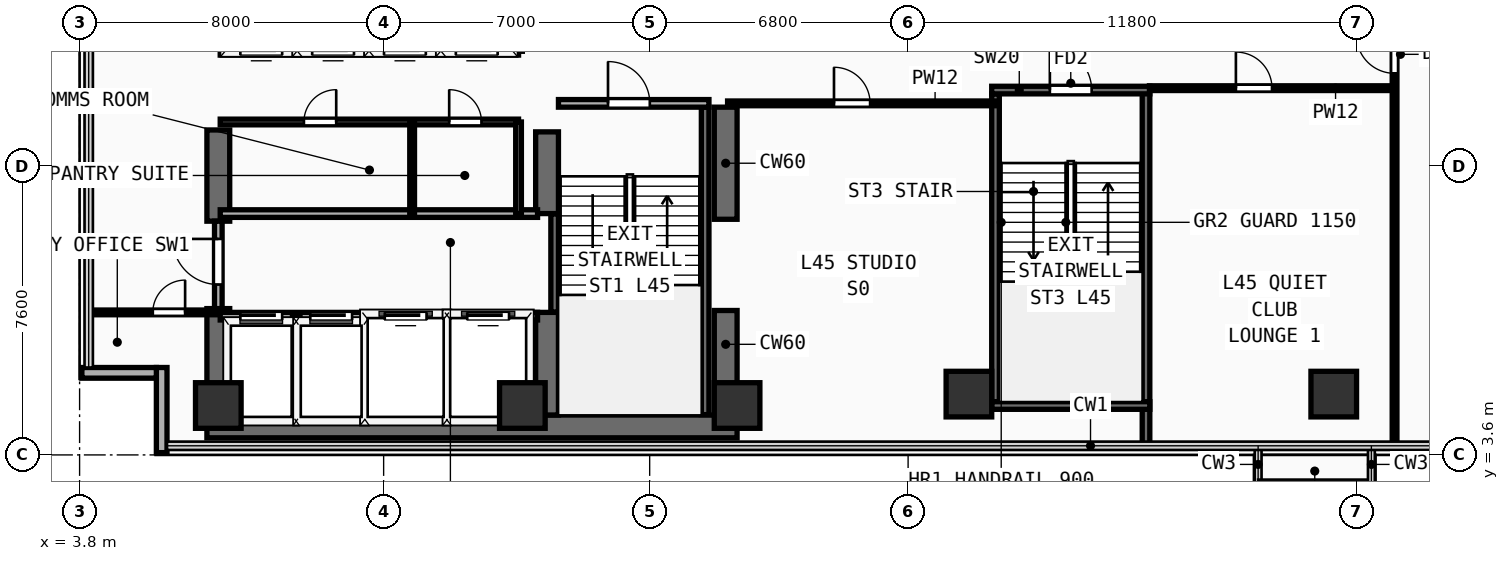
"""IFC4 building model, lengths in metres.
Left out: names, types, materials, properties, quantities, classifications, styles, units other than length and angle.
Written with IfcOpenShell. Run it as: python <this file> out.ifc"""

import sys

from ifc_helpers import new_model, si_unit, direction, frame, frame_2d, origin, origin_2d, place, context, subcontext, project, spatial, rectangle, extrude, element, fill, save


model = new_model("IFC4")
c1 = context("Model", 3, precision=1e-05, world=origin(), true_north=direction((0.0, 1.0)))
c2 = subcontext(c1, "Body", "Model", "MODEL_VIEW")
j1 = project(units=[si_unit("LENGTHUNIT", "METRE"), si_unit("PLANEANGLEUNIT", "RADIAN")], contexts=[c1])
p1 = place(None, origin())
s1 = spatial("IfcSite", under=j1, at=p1, CompositionType="ELEMENT")
p2 = place(p1, origin())
s2 = spatial("IfcBuilding", under=s1, at=p2, CompositionType="ELEMENT")
p3 = place(p2, frame((0.0, 0.0, 176.6)))
s3 = spatial("IfcBuildingStorey", under=s2, at=p3, CompositionType="ELEMENT", Elevation=176.6)
p4 = place(p3, frame((7.15, 4.35, 0.0), z_axis=(0.0, 0.0, 1.0), x_axis=(1.0, 0.0, 0.0)))
e1 = element("IfcWall", 1, at=p4, inside=s3, PredefinedType="SHEAR", context=c2, shape_type="SweptSolid", body=[
    extrude(rectangle(XDim=13.95, YDim=0.6, at=frame_2d((6.975, 0.0))), origin(), (0.0, 0.0, 1.0), 3.56),
])
p5 = place(p3, frame((7.45, 4.65, 0.0), z_axis=(0.0, 0.0, 1.0), x_axis=(0.0, 1.0, 0.0)))
e2 = element("IfcWall", 2, at=p5, inside=s3, PredefinedType="SHEAR", context=c2, shape_type="SweptSolid", body=[
    extrude(rectangle(XDim=2.8, YDim=0.6, at=frame_2d((1.4, 0.0))), origin(), (0.0, 0.0, 1.0), 3.56),
])
p6 = place(p3, frame((7.45, 9.75, 0.0), z_axis=(0.0, 0.0, 1.0), x_axis=(0.0, 1.0, 0.0)))
e3 = element("IfcWall", 3, at=p6, inside=s3, PredefinedType="SHEAR", context=c2, shape_type="SweptSolid", body=[
    extrude(rectangle(XDim=2.4, YDim=0.6, at=frame_2d((1.2, 0.0))), origin(), (0.0, 0.0, 1.0), 3.56),
])
p7 = place(p3, frame((20.8, 4.65, 0.0), z_axis=(0.0, 0.0, 1.0), x_axis=(0.0, 1.0, 0.0)))
e4 = element("IfcWall", 4, at=p7, inside=s3, PredefinedType="SHEAR", context=c2, shape_type="SweptSolid", body=[
    extrude(rectangle(XDim=2.75, YDim=0.6, at=frame_2d((1.375, 0.0))), origin(), (0.0, 0.0, 1.0), 3.56),
])
p8 = place(p3, frame((20.8, 9.8, 0.0), z_axis=(0.0, 0.0, 1.0), x_axis=(0.0, 1.0, 0.0)))
e5 = element("IfcWall", 5, at=p8, inside=s3, PredefinedType="SHEAR", context=c2, shape_type="SweptSolid", body=[
    extrude(rectangle(XDim=2.95, YDim=0.6, at=frame_2d((1.475, 0.0))), origin(), (0.0, 0.0, 1.0), 3.56),
])
p9 = place(p3, frame((16.1, 4.65, 0.0), z_axis=(0.0, 0.0, 1.0), x_axis=(0.0, 1.0, 0.0)))
e6 = element("IfcWall", 6, at=p9, inside=s3, PredefinedType="SHEAR", context=c2, shape_type="SweptSolid", body=[
    extrude(rectangle(XDim=2.7, YDim=0.6, at=frame_2d((1.35, 0.0))), origin(), (0.0, 0.0, 1.0), 3.56),
])
p10 = place(p3, frame((16.1, 9.95, 0.0), z_axis=(0.0, 0.0, 1.0), x_axis=(0.0, 1.0, 0.0)))
e7 = element("IfcWall", 7, at=p10, inside=s3, PredefinedType="SHEAR", context=c2, shape_type="SweptSolid", body=[
    extrude(rectangle(XDim=2.15, YDim=0.6, at=frame_2d((1.075, 0.0))), origin(), (0.0, 0.0, 1.0), 3.56),
])
for number, where, z_axis, x_axis in (
    (8, (7.45, 4.9, 0.0), (0.0, 0.0, 1.0), (1.0, 0.0, 0.0)),
    (9, (15.45, 4.9, 0.0), (0.0, 0.0, 1.0), (1.0, 0.0, 0.0)),
    (10, (21.1, 4.9, 0.0), (0.0, 0.0, 1.0), (1.0, 0.0, 0.0)),
    (11, (27.2, 5.2, 0.0), (0.0, 0.0, 1.0), (1.0, 0.0, 0.0)),
    (12, (36.8, 5.2, 0.0), (0.0, 0.0, 1.0), (1.0, 0.0, 0.0)),
):
    element("IfcColumn", number, at=place(p3, frame(where, z_axis=z_axis, x_axis=x_axis)), inside=s3, PredefinedType="COLUMN", context=c2, shape_type="SweptSolid", body=[
        extrude(rectangle(XDim=1.2, YDim=1.2, at=origin_2d()), origin(), (0.0, 0.0, 1.0), 3.56),
    ])
p11 = place(p3, frame((5.96, 3.66, 0.0), z_axis=(0.0, 0.0, 1.0), x_axis=(0.0, 1.0, 0.0)))
e13 = element("IfcWall", 13, at=p11, inside=s3, PredefinedType="SOLIDWALL", context=c2, shape_type="SweptSolid", body=[
    extrude(rectangle(XDim=2.24, YDim=0.28, at=frame_2d((1.12, 0.0))), origin(), (0.0, 0.0, 1.0), 3.56),
])
p12 = place(p3, frame((3.86, 5.76, 0.0), z_axis=(0.0, 0.0, 1.0), x_axis=(1.0, 0.0, 0.0)))
e14 = element("IfcWall", 14, at=p12, inside=s3, PredefinedType="SOLIDWALL", context=c2, shape_type="SweptSolid", body=[
    extrude(rectangle(XDim=1.96, YDim=0.28, at=frame_2d((0.98, 0.0))), origin(), (0.0, 0.0, 1.0), 3.56),
])
p13 = place(p3, frame((16.3, 7.36, 0.0), z_axis=(0.0, 0.0, 1.0), x_axis=(0.0, 1.0, 0.0)))
e15 = element("IfcWall", 15, at=p13, inside=s3, PredefinedType="SHEAR", context=c2, shape_type="SweptSolid", body=[
    extrude(rectangle(XDim=2.58, YDim=0.2, at=frame_2d((1.29, 0.0))), origin(), (0.0, 0.0, 1.0), 3.56),
])
p14 = place(p3, frame((20.26, 4.66, 0.0), z_axis=(0.0, 0.0, 1.0), x_axis=(0.0, 1.0, 0.0)))
e16 = element("IfcWall", 16, at=p14, inside=s3, PredefinedType="SHEAR", context=c2, shape_type="SweptSolid", body=[
    extrude(rectangle(XDim=8.09, YDim=0.2, at=frame_2d((4.045, 0.0))), origin(), (0.0, 0.0, 1.0), 3.56),
])
p15 = place(p3, frame((16.4, 12.85, 0.0), z_axis=(0.0, 0.0, 1.0), x_axis=(1.0, 0.0, 0.0)))
e17 = element("IfcWall", 17, at=p15, inside=s3, PredefinedType="PARTITIONING", context=c2, shape_type="SweptSolid", body=[
    extrude(rectangle(XDim=3.96, YDim=0.2, at=frame_2d((1.98, 0.0))), origin(), (0.0, 0.0, 1.0), 3.56),
])
p16 = place(p15, frame((1.304, 0.0, 0.0)))
e18 = element("IfcOpeningElement", 18, at=p16, cuts=e17, PredefinedType="OPENING", context=c2, shape_type="SweptSolid", body=[
    extrude(rectangle(XDim=1.1, YDim=2.2, at=frame_2d((0.55, 1.1))), frame((0.0, 0.11, 0.0), z_axis=(0.0, -1.0, 0.0), x_axis=(1.0, 0.0, 0.0)), (0.0, 0.0, 1.0), 0.22),
])
p17 = place(p3, frame((27.9, 5.0, 0.0), z_axis=(0.0, 0.0, 1.0), x_axis=(0.0, 1.0, 0.0)))
e19 = element("IfcWall", 19, at=p17, inside=s3, PredefinedType="SHEAR", context=c2, shape_type="SweptSolid", body=[
    extrude(rectangle(XDim=8.1, YDim=0.2, at=frame_2d((4.05, 0.0))), origin(), (0.0, 0.0, 1.0), 3.56),
])
p18 = place(p3, frame((31.86, 3.84, 0.0), z_axis=(0.0, 0.0, 1.0), x_axis=(0.0, 1.0, 0.0)))
e20 = element("IfcWall", 20, at=p18, inside=s3, PredefinedType="SHEAR", context=c2, shape_type="SweptSolid", body=[
    extrude(rectangle(XDim=9.41, YDim=0.2, at=frame_2d((4.705, 0.0))), origin(), (0.0, 0.0, 1.0), 3.56),
])
p19 = place(p3, frame((27.8, 4.9, 0.0), z_axis=(0.0, 0.0, 1.0), x_axis=(1.0, 0.0, 0.0)))
e21 = element("IfcWall", 21, at=p19, inside=s3, PredefinedType="SHEAR", context=c2, shape_type="SweptSolid", body=[
    extrude(rectangle(XDim=4.16, YDim=0.2, at=frame_2d((2.08, 0.0))), origin(), (0.0, 0.0, 1.0), 3.56),
])
p20 = place(p3, frame((27.8, 13.2, 0.0), z_axis=(0.0, 0.0, 1.0), x_axis=(1.0, 0.0, 0.0)))
e22 = element("IfcWall", 22, at=p20, inside=s3, PredefinedType="SHEAR", context=c2, shape_type="SweptSolid", body=[
    extrude(rectangle(XDim=4.16, YDim=0.2, at=frame_2d((2.08, 0.0))), origin(), (0.0, 0.0, 1.0), 3.56),
])
p21 = place(p20, frame((1.53, 0.0, 0.0)))
e23 = element("IfcOpeningElement", 23, at=p21, cuts=e22, PredefinedType="OPENING", context=c2, shape_type="SweptSolid", body=[
    extrude(rectangle(XDim=1.1, YDim=2.2, at=frame_2d((0.55, 1.1))), frame((0.0, 0.11, 0.0), z_axis=(0.0, -1.0, 0.0), x_axis=(1.0, 0.0, 0.0)), (0.0, 0.0, 1.0), 0.22),
])
p22 = place(p3, frame((7.5, 7.25, 0.0), z_axis=(0.0, 0.0, 1.0), x_axis=(1.0, 0.0, 0.0)))
e24 = element("IfcWall", 24, at=p22, inside=s3, PredefinedType="PARTITIONING", context=c2, shape_type="SweptSolid", body=[
    extrude(rectangle(XDim=8.35, YDim=0.2, at=frame_2d((4.175, 0.0))), origin(), (0.0, 0.0, 1.0), 3.56),
])
p23 = place(p22, frame((0.53, 0.0, 0.0)))
e25 = element("IfcOpeningElement", 25, at=p23, cuts=e24, PredefinedType="OPENING", context=c2, shape_type="SweptSolid", body=[
    extrude(rectangle(XDim=1.1, YDim=2.2, at=frame_2d((0.55, 1.1))), frame((0.0, 0.11, 0.0), z_axis=(0.0, -1.0, 0.0), x_axis=(1.0, 0.0, 0.0)), (0.0, 0.0, 1.0), 0.22),
])
p24 = place(p22, frame((2.37, 0.0, 0.0)))
e26 = element("IfcOpeningElement", 26, at=p24, cuts=e24, PredefinedType="OPENING", context=c2, shape_type="SweptSolid", body=[
    extrude(rectangle(XDim=1.1, YDim=2.2, at=frame_2d((0.55, 1.1))), frame((0.0, 0.11, 0.0), z_axis=(0.0, -1.0, 0.0), x_axis=(1.0, 0.0, 0.0)), (0.0, 0.0, 1.0), 0.22),
])
p25 = place(p22, frame((4.33, 0.0, 0.0)))
e27 = element("IfcOpeningElement", 27, at=p25, cuts=e24, PredefinedType="OPENING", context=c2, shape_type="SweptSolid", body=[
    extrude(rectangle(XDim=1.1, YDim=2.2, at=frame_2d((0.55, 1.1))), frame((0.0, 0.11, 0.0), z_axis=(0.0, -1.0, 0.0), x_axis=(1.0, 0.0, 0.0)), (0.0, 0.0, 1.0), 0.22),
])
p26 = place(p22, frame((6.5, 0.0, 0.0)))
e28 = element("IfcOpeningElement", 28, at=p26, cuts=e24, PredefinedType="OPENING", context=c2, shape_type="SweptSolid", body=[
    extrude(rectangle(XDim=1.1, YDim=2.2, at=frame_2d((0.55, 1.1))), frame((0.0, 0.11, 0.0), z_axis=(0.0, -1.0, 0.0), x_axis=(1.0, 0.0, 0.0)), (0.0, 0.0, 1.0), 0.22),
])
p27 = place(p3, frame((7.5, 9.95, 0.0), z_axis=(0.0, 0.0, 1.0), x_axis=(1.0, 0.0, 0.0)))
e29 = element("IfcWall", 29, at=p27, inside=s3, PredefinedType="PARTITIONING", context=c2, shape_type="SweptSolid", body=[
    extrude(rectangle(XDim=8.35, YDim=0.2, at=frame_2d((4.175, 0.0))), origin(), (0.0, 0.0, 1.0), 3.56),
])
for number, where, z_axis, x_axis in (
    (30, (9.5, 4.45, 0.0), (0.0, 0.0, 1.0), (0.0, 1.0, 0.0)),
    (31, (11.36, 4.45, 0.0), (0.0, 0.0, 1.0), (0.0, 1.0, 0.0)),
    (32, (13.46, 4.45, 0.0), (0.0, 0.0, 1.0), (0.0, 1.0, 0.0)),
):
    element("IfcWall", number, at=place(p3, frame(where, z_axis=z_axis, x_axis=x_axis)), inside=s3, PredefinedType="PARTITIONING", context=c2, shape_type="SweptSolid", body=[
        extrude(rectangle(XDim=2.8, YDim=0.2, at=frame_2d((1.4, 0.0))), origin(), (0.0, 0.0, 1.0), 3.56),
    ])
p28 = place(p3, frame((7.45, 7.45, 0.0), z_axis=(0.0, 0.0, 1.0), x_axis=(0.0, 1.0, 0.0)))
e33 = element("IfcWall", 33, at=p28, inside=s3, PredefinedType="PARTITIONING", context=c2, shape_type="SweptSolid", body=[
    extrude(rectangle(XDim=2.3, YDim=0.2, at=frame_2d((1.15, 0.0))), origin(), (0.0, 0.0, 1.0), 2.54),
])
p29 = place(p28, frame((0.633, 0.0, 0.0)))
e34 = element("IfcOpeningElement", 34, at=p29, cuts=e33, PredefinedType="OPENING", context=c2, shape_type="SweptSolid", body=[
    extrude(rectangle(XDim=1.2, YDim=2.25, at=frame_2d((0.6, 1.125))), frame((0.0, 0.11, 0.0), z_axis=(0.0, -1.0, 0.0), x_axis=(1.0, 0.0, 0.0)), (0.0, 0.0, 1.0), 0.22),
])
p30 = place(p3, frame((7.5, 12.36, 0.0), z_axis=(0.0, 0.0, 1.0), x_axis=(1.0, 0.0, 0.0)))
e35 = element("IfcWall", 35, at=p30, inside=s3, PredefinedType="PARTITIONING", context=c2, shape_type="SweptSolid", body=[
    extrude(rectangle(XDim=7.85, YDim=0.15, at=frame_2d((3.925, 0.0))), origin(), (0.0, 0.0, 1.0), 3.56),
])
p31 = place(p30, frame((2.202, 0.0, 0.0)))
e36 = element("IfcOpeningElement", 36, at=p31, cuts=e35, PredefinedType="OPENING", context=c2, shape_type="SweptSolid", body=[
    extrude(rectangle(XDim=0.85, YDim=2.15, at=frame_2d((0.425, 1.075))), frame((0.0, 0.085, 0.0), z_axis=(0.0, -1.0, 0.0), x_axis=(1.0, 0.0, 0.0)), (0.0, 0.0, 1.0), 0.17),
])
p32 = place(p30, frame((6.025, 0.0, 0.0)))
e37 = element("IfcOpeningElement", 37, at=p32, cuts=e35, PredefinedType="OPENING", context=c2, shape_type="SweptSolid", body=[
    extrude(rectangle(XDim=0.85, YDim=2.15, at=frame_2d((0.425, 1.075))), frame((0.0, 0.085, 0.0), z_axis=(0.0, -1.0, 0.0), x_axis=(1.0, 0.0, 0.0)), (0.0, 0.0, 1.0), 0.17),
])
p33 = place(p3, frame((15.35, 9.95, 0.0), z_axis=(0.0, 0.0, 1.0), x_axis=(0.0, 1.0, 0.0)))
e38 = element("IfcWall", 38, at=p33, inside=s3, PredefinedType="PARTITIONING", context=c2, shape_type="SweptSolid", body=[
    extrude(rectangle(XDim=2.41, YDim=0.15, at=frame_2d((1.205, 0.0))), origin(), (0.0, 0.0, 1.0), 3.56),
])
p34 = place(p3, frame((12.55, 9.95, 0.0), z_axis=(0.0, 0.0, 1.0), x_axis=(0.0, 1.0, 0.0)))
e39 = element("IfcWall", 39, at=p34, inside=s3, PredefinedType="PARTITIONING", context=c2, shape_type="SweptSolid", body=[
    extrude(rectangle(XDim=2.41, YDim=0.125, at=frame_2d((1.205, 0.0))), origin(), (0.0, 0.0, 1.0), 3.56),
])
p35 = place(p3, frame((7.5, 14.22, 0.0), z_axis=(0.0, 0.0, 1.0), x_axis=(1.0, 0.0, 0.0)))
e40 = element("IfcWall", 40, at=p35, inside=s3, PredefinedType="PARTITIONING", context=c2, shape_type="SweptSolid", body=[
    extrude(rectangle(XDim=7.85, YDim=0.2, at=frame_2d((3.925, 0.0))), origin(), (0.0, 0.0, 1.0), 3.56),
])
p36 = place(p35, frame((0.53, 0.0, 0.0)))
e41 = element("IfcOpeningElement", 41, at=p36, cuts=e40, PredefinedType="OPENING", context=c2, shape_type="SweptSolid", body=[
    extrude(rectangle(XDim=1.1, YDim=2.2, at=frame_2d((0.55, 1.1))), frame((0.0, 0.11, 0.0), z_axis=(0.0, -1.0, 0.0), x_axis=(1.0, 0.0, 0.0)), (0.0, 0.0, 1.0), 0.22),
])
p37 = place(p35, frame((2.42, 0.0, 0.0)))
e42 = element("IfcOpeningElement", 42, at=p37, cuts=e40, PredefinedType="OPENING", context=c2, shape_type="SweptSolid", body=[
    extrude(rectangle(XDim=1.1, YDim=2.2, at=frame_2d((0.55, 1.1))), frame((0.0, 0.11, 0.0), z_axis=(0.0, -1.0, 0.0), x_axis=(1.0, 0.0, 0.0)), (0.0, 0.0, 1.0), 0.22),
])
p38 = place(p35, frame((4.31, 0.0, 0.0)))
e43 = element("IfcOpeningElement", 43, at=p38, cuts=e40, PredefinedType="OPENING", context=c2, shape_type="SweptSolid", body=[
    extrude(rectangle(XDim=1.1, YDim=2.2, at=frame_2d((0.55, 1.1))), frame((0.0, 0.11, 0.0), z_axis=(0.0, -1.0, 0.0), x_axis=(1.0, 0.0, 0.0)), (0.0, 0.0, 1.0), 0.22),
])
p39 = place(p35, frame((6.2, 0.0, 0.0)))
e44 = element("IfcOpeningElement", 44, at=p39, cuts=e40, PredefinedType="OPENING", context=c2, shape_type="SweptSolid", body=[
    extrude(rectangle(XDim=1.1, YDim=2.2, at=frame_2d((0.55, 1.1))), frame((0.0, 0.11, 0.0), z_axis=(0.0, -1.0, 0.0), x_axis=(1.0, 0.0, 0.0)), (0.0, 0.0, 1.0), 0.22),
])
p40 = place(p3, frame((4.04, 7.35, 0.0), z_axis=(0.0, 0.0, 1.0), x_axis=(1.0, 0.0, 0.0)))
e45 = element("IfcWall", 45, at=p40, inside=s3, PredefinedType="PARTITIONING", context=c2, shape_type="SweptSolid", body=[
    extrude(rectangle(XDim=3.36, YDim=0.125, at=frame_2d((1.68, 0.0))), origin(), (0.0, 0.0, 1.0), 3.56),
])
p41 = place(p40, frame((1.687, 0.0, 0.0)))
e46 = element("IfcOpeningElement", 46, at=p41, cuts=e45, PredefinedType="OPENING", context=c2, shape_type="SweptSolid", body=[
    extrude(rectangle(XDim=0.85, YDim=2.15, at=frame_2d((0.425, 1.075))), frame((0.0, 0.073, 0.0), z_axis=(0.0, -1.0, 0.0), x_axis=(1.0, 0.0, 0.0)), (0.0, 0.0, 1.0), 0.145),
])
p42 = place(p3, frame((20.85, 12.85, 0.0), z_axis=(0.0, 0.0, 1.0), x_axis=(1.0, 0.0, 0.0)))
e47 = element("IfcWall", 47, at=p42, inside=s3, PredefinedType="PARTITIONING", context=c2, shape_type="SweptSolid", body=[
    extrude(rectangle(XDim=7.05, YDim=0.125, at=frame_2d((3.525, 0.0))), origin(), (0.0, 0.0, 1.0), 3.56),
])
p43 = place(p42, frame((2.8, 0.0, 0.0)))
e48 = element("IfcOpeningElement", 48, at=p43, cuts=e47, PredefinedType="OPENING", context=c2, shape_type="SweptSolid", body=[
    extrude(rectangle(XDim=0.95, YDim=2.15, at=frame_2d((0.475, 1.075))), frame((0.0, 0.073, 0.0), z_axis=(0.0, -1.0, 0.0), x_axis=(1.0, 0.0, 0.0)), (0.0, 0.0, 1.0), 0.145),
])
p44 = place(p3, frame((31.95, 13.25, 0.0), z_axis=(0.0, 0.0, 1.0), x_axis=(1.0, 0.0, 0.0)))
e49 = element("IfcWall", 49, at=p44, inside=s3, PredefinedType="PARTITIONING", context=c2, shape_type="SweptSolid", body=[
    extrude(rectangle(XDim=6.45, YDim=0.125, at=frame_2d((3.225, 0.0))), origin(), (0.0, 0.0, 1.0), 3.16),
])
p45 = place(p44, frame((2.275, 0.0, 0.0)))
e50 = element("IfcOpeningElement", 50, at=p45, cuts=e49, PredefinedType="OPENING", context=c2, shape_type="SweptSolid", body=[
    extrude(rectangle(XDim=0.95, YDim=2.15, at=frame_2d((0.475, 1.075))), frame((0.0, 0.073, 0.0), z_axis=(0.0, -1.0, 0.0), x_axis=(1.0, 0.0, 0.0)), (0.0, 0.0, 1.0), 0.145),
])
p46 = place(p3, frame((38.4, 3.84, 0.0), z_axis=(0.0, 0.0, 1.0), x_axis=(0.0, 1.0, 0.0)))
e51 = element("IfcWall", 51, at=p46, inside=s3, PredefinedType="PARTITIONING", context=c2, shape_type="SweptSolid", body=[
    extrude(rectangle(XDim=17.12, YDim=0.125, at=frame_2d((8.56, 0.0))), origin(), (0.0, 0.0, 1.0), 3.56),
])
p47 = place(p46, frame((9.8, 0.0, 0.0)))
e52 = element("IfcOpeningElement", 52, at=p47, cuts=e51, PredefinedType="OPENING", context=c2, shape_type="SweptSolid", body=[
    extrude(rectangle(XDim=1.0, YDim=2.2, at=frame_2d((0.5, 1.1))), frame((0.0, 0.073, 0.0), z_axis=(0.0, -1.0, 0.0), x_axis=(1.0, 0.0, 0.0)), (0.0, 0.0, 1.0), 0.145),
])
p48 = place(p16, frame((1.1, 0.0, 0.0), z_axis=(0.0, 0.0, 1.0), x_axis=(-1.0, 0.0, 0.0)))
e53 = element("IfcDoor", 53, at=p48, inside=s3, OperationType="SINGLE_SWING_RIGHT", PredefinedType="DOOR", context=c2, shape_type="SweptSolid", body=[
    extrude(rectangle(XDim=1.1, YDim=2.2, at=frame_2d((0.55, 1.1))), frame((0.0, 0.025, 0.0), z_axis=(0.0, -1.0, 0.0), x_axis=(1.0, 0.0, 0.0)), (0.0, 0.0, 1.0), 0.05),
])
fill(e18, e53)
p49 = place(p21, frame((1.1, 0.0, 0.0), z_axis=(0.0, 0.0, 1.0), x_axis=(-1.0, 0.0, 0.0)))
e54 = element("IfcDoor", 54, at=p49, inside=s3, OperationType="SINGLE_SWING_RIGHT", PredefinedType="DOOR", context=c2, shape_type="SweptSolid", body=[
    extrude(rectangle(XDim=1.1, YDim=2.2, at=frame_2d((0.55, 1.1))), frame((0.0, 0.025, 0.0), z_axis=(0.0, -1.0, 0.0), x_axis=(1.0, 0.0, 0.0)), (0.0, 0.0, 1.0), 0.05),
])
fill(e23, e54)
p50 = place(p23, origin())
e55 = element("IfcDoor", 55, at=p50, inside=s3, OperationType="SLIDING_TO_LEFT", PredefinedType="DOOR", context=c2, shape_type="SweptSolid", body=[
    extrude(rectangle(XDim=1.1, YDim=2.2, at=frame_2d((0.55, 1.1))), frame((0.0, 0.025, 0.0), z_axis=(0.0, -1.0, 0.0), x_axis=(1.0, 0.0, 0.0)), (0.0, 0.0, 1.0), 0.05),
])
fill(e25, e55)
p51 = place(p24, origin())
e56 = element("IfcDoor", 56, at=p51, inside=s3, OperationType="SLIDING_TO_LEFT", PredefinedType="DOOR", context=c2, shape_type="SweptSolid", body=[
    extrude(rectangle(XDim=1.1, YDim=2.2, at=frame_2d((0.55, 1.1))), frame((0.0, 0.025, 0.0), z_axis=(0.0, -1.0, 0.0), x_axis=(1.0, 0.0, 0.0)), (0.0, 0.0, 1.0), 0.05),
])
fill(e26, e56)
p52 = place(p25, origin())
e57 = element("IfcDoor", 57, at=p52, inside=s3, OperationType="SLIDING_TO_LEFT", PredefinedType="DOOR", context=c2, shape_type="SweptSolid", body=[
    extrude(rectangle(XDim=1.1, YDim=2.2, at=frame_2d((0.55, 1.1))), frame((0.0, 0.025, 0.0), z_axis=(0.0, -1.0, 0.0), x_axis=(1.0, 0.0, 0.0)), (0.0, 0.0, 1.0), 0.05),
])
fill(e27, e57)
p53 = place(p26, origin())
e58 = element("IfcDoor", 58, at=p53, inside=s3, OperationType="SLIDING_TO_LEFT", PredefinedType="DOOR", context=c2, shape_type="SweptSolid", body=[
    extrude(rectangle(XDim=1.1, YDim=2.2, at=frame_2d((0.55, 1.1))), frame((0.0, 0.025, 0.0), z_axis=(0.0, -1.0, 0.0), x_axis=(1.0, 0.0, 0.0)), (0.0, 0.0, 1.0), 0.05),
])
fill(e28, e58)
p54 = place(p29, frame((1.2, 0.0, 0.0), z_axis=(0.0, 0.0, 1.0), x_axis=(-1.0, 0.0, 0.0)))
e59 = element("IfcDoor", 59, at=p54, inside=s3, OperationType="SINGLE_SWING_LEFT", PredefinedType="DOOR", context=c2, shape_type="SweptSolid", body=[
    extrude(rectangle(XDim=1.2, YDim=2.25, at=frame_2d((0.6, 1.125))), frame((0.0, 0.025, 0.0), z_axis=(0.0, -1.0, 0.0), x_axis=(1.0, 0.0, 0.0)), (0.0, 0.0, 1.0), 0.05),
])
fill(e34, e59)
p55 = place(p31, origin())
e60 = element("IfcDoor", 60, at=p55, inside=s3, OperationType="SINGLE_SWING_RIGHT", PredefinedType="DOOR", context=c2, shape_type="SweptSolid", body=[
    extrude(rectangle(XDim=0.85, YDim=2.15, at=frame_2d((0.425, 1.075))), frame((0.0, 0.025, 0.0), z_axis=(0.0, -1.0, 0.0), x_axis=(1.0, 0.0, 0.0)), (0.0, 0.0, 1.0), 0.05),
])
fill(e36, e60)
p56 = place(p32, origin())
e61 = element("IfcDoor", 61, at=p56, inside=s3, OperationType="SINGLE_SWING_LEFT", PredefinedType="DOOR", context=c2, shape_type="SweptSolid", body=[
    extrude(rectangle(XDim=0.85, YDim=2.15, at=frame_2d((0.425, 1.075))), frame((0.0, 0.025, 0.0), z_axis=(0.0, -1.0, 0.0), x_axis=(1.0, 0.0, 0.0)), (0.0, 0.0, 1.0), 0.05),
])
fill(e37, e61)
p57 = place(p41, origin())
e62 = element("IfcDoor", 62, at=p57, inside=s3, OperationType="SINGLE_SWING_RIGHT", PredefinedType="DOOR", context=c2, shape_type="SweptSolid", body=[
    extrude(rectangle(XDim=0.85, YDim=2.15, at=frame_2d((0.425, 1.075))), frame((0.0, 0.025, 0.0), z_axis=(0.0, -1.0, 0.0), x_axis=(1.0, 0.0, 0.0)), (0.0, 0.0, 1.0), 0.05),
])
fill(e46, e62)
p58 = place(p43, origin())
e63 = element("IfcDoor", 63, at=p58, inside=s3, OperationType="SINGLE_SWING_LEFT", PredefinedType="DOOR", context=c2, shape_type="SweptSolid", body=[
    extrude(rectangle(XDim=0.95, YDim=2.15, at=frame_2d((0.475, 1.075))), frame((0.0, 0.025, 0.0), z_axis=(0.0, -1.0, 0.0), x_axis=(1.0, 0.0, 0.0)), (0.0, 0.0, 1.0), 0.05),
])
fill(e48, e63)
p59 = place(p45, origin())
e64 = element("IfcDoor", 64, at=p59, inside=s3, OperationType="SINGLE_SWING_LEFT", PredefinedType="DOOR", context=c2, shape_type="SweptSolid", body=[
    extrude(rectangle(XDim=0.95, YDim=2.15, at=frame_2d((0.475, 1.075))), frame((0.0, 0.025, 0.0), z_axis=(0.0, -1.0, 0.0), x_axis=(1.0, 0.0, 0.0)), (0.0, 0.0, 1.0), 0.05),
])
fill(e50, e64)
p60 = place(p47, origin())
e65 = element("IfcDoor", 65, at=p60, inside=s3, OperationType="SINGLE_SWING_RIGHT", PredefinedType="DOOR", context=c2, shape_type="SweptSolid", body=[
    extrude(rectangle(XDim=1.0, YDim=2.2, at=frame_2d((0.5, 1.1))), frame((0.0, 0.025, 0.0), z_axis=(0.0, -1.0, 0.0), x_axis=(1.0, 0.0, 0.0)), (0.0, 0.0, 1.0), 0.05),
])
fill(e52, e65)
save(model, sys.argv[1])
